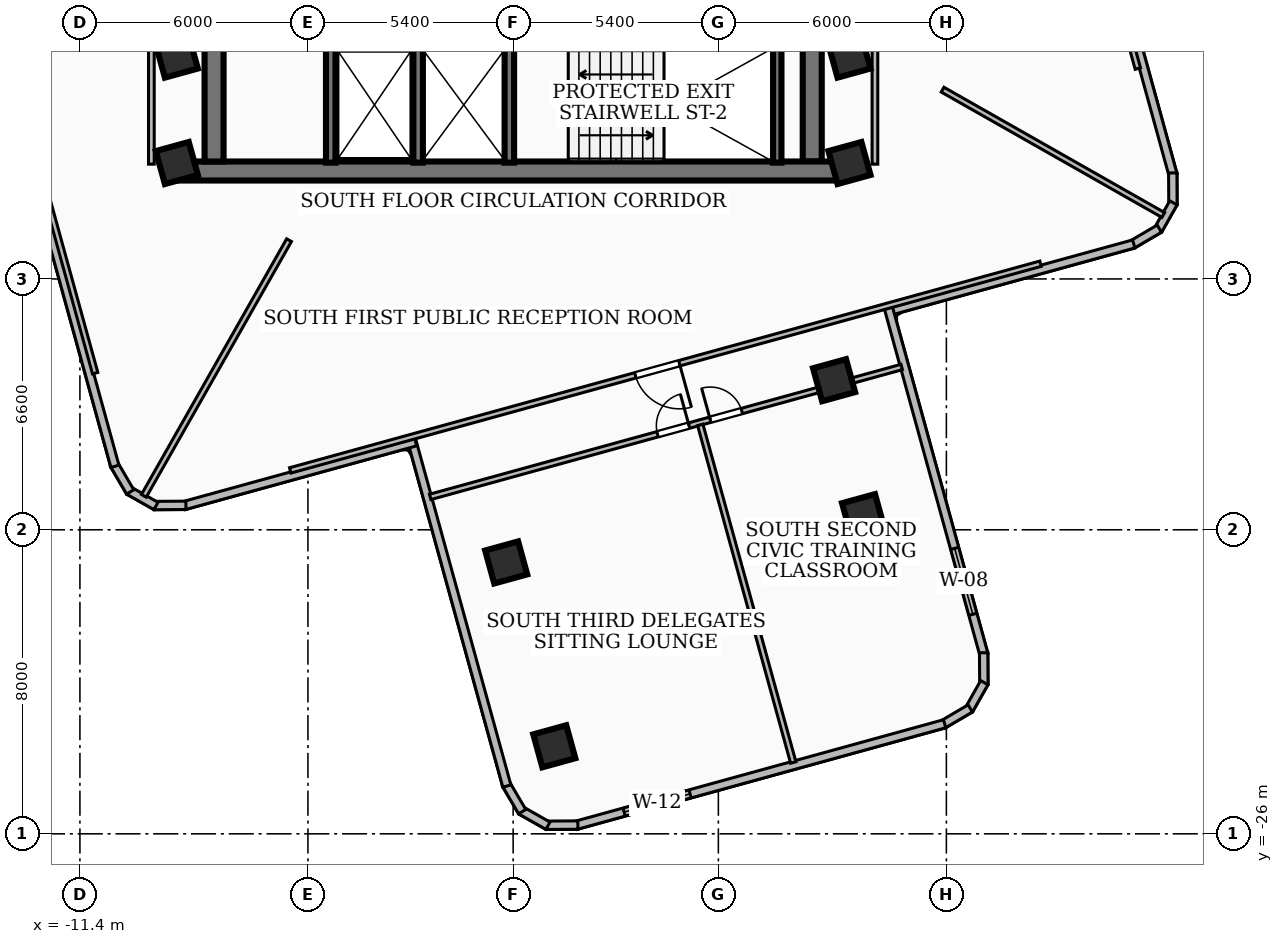
"""IFC4 building model, lengths in metres.
Left out: names, types, materials, properties, quantities, classifications, styles, units other than length and angle.
Written with IfcOpenShell. Run it as: python <this file> out.ifc"""

import sys

from ifc_helpers import new_model, si_unit, direction, frame, frame_2d, origin, origin_2d, place, context, subcontext, project, spatial, rectangle, extrude, element, fill, save


model = new_model("IFC4")
c1 = context("Model", 3, precision=1e-05, world=origin(), true_north=direction((0.0, 1.0)))
c2 = subcontext(c1, "Body", "Model", "MODEL_VIEW")
j1 = project(units=[si_unit("LENGTHUNIT", "METRE"), si_unit("PLANEANGLEUNIT", "RADIAN")], contexts=[c1])
p1 = place(None, origin())
s1 = spatial("IfcSite", under=j1, at=p1, CompositionType="ELEMENT")
p2 = place(p1, origin())
s2 = spatial("IfcBuilding", under=s1, at=p2, CompositionType="ELEMENT")
p3 = place(p2, frame((0.0, 0.0, 137.88)))
s3 = spatial("IfcBuildingStorey", under=s2, at=p3, CompositionType="ELEMENT", Elevation=137.88)
p4 = place(p3, frame((8.78, -8.56, 0.0), z_axis=(0.0, 0.0, 1.0), x_axis=(-1.0, 0.0, 0.0)))
e1 = element("IfcWall", 1, at=p4, inside=s3, PredefinedType="SHEAR", context=c2, shape_type="SweptSolid", body=[
    extrude(rectangle(XDim=17.56, YDim=0.5, at=frame_2d((8.78, 0.0))), origin(), (0.0, 0.0, 1.0), 3.32),
])
for number, where, z_axis, x_axis in (
    (2, (-7.87, -8.31, 0.0), (0.0, 0.0, 1.0), (0.0, 1.0, 0.0)),
    (3, (7.87, -2.0, 0.0), (0.0, 0.0, 1.0), (0.0, -1.0, 0.0)),
):
    element("IfcWall", number, at=place(p3, frame(where, z_axis=z_axis, x_axis=x_axis)), inside=s3, PredefinedType="SHEAR", context=c2, shape_type="SweptSolid", body=[
        extrude(rectangle(XDim=6.31, YDim=0.5, at=frame_2d((3.155, 0.0))), origin(), (0.0, 0.0, 1.0), 3.32),
    ])
p5 = place(p3, frame((6.95, -8.34, 0.0), z_axis=(0.0, 0.0, 1.0), x_axis=(0.0, 1.0, 0.0)))
e4 = element("IfcWall", 4, at=p5, inside=s3, PredefinedType="SOLIDWALL", context=c2, shape_type="SweptSolid", body=[
    extrude(rectangle(XDim=3.06, YDim=0.22, at=frame_2d((1.53, 0.0))), origin(), (0.0, 0.0, 1.0), 3.32),
])
for number, where, z_axis, x_axis in (
    (5, (-0.1, -8.34, 0.0), (0.0, 0.0, 1.0), (0.0, 1.0, 0.0)),
    (6, (-2.5, -8.34, 0.0), (0.0, 0.0, 1.0), (0.0, 1.0, 0.0)),
    (7, (-4.8, -8.34, 0.0), (0.0, 0.0, 1.0), (0.0, 1.0, 0.0)),
):
    element("IfcWall", number, at=place(p3, frame(where, z_axis=z_axis, x_axis=x_axis)), inside=s3, PredefinedType="SOLIDWALL", context=c2, shape_type="SweptSolid", body=[
        extrude(rectangle(XDim=3.04, YDim=0.25, at=frame_2d((1.52, 0.0))), origin(), (0.0, 0.0, 1.0), 3.32),
    ])
for number, where, z_axis, x_axis in (
    (8, (-8.85, -5.55, 0.0), (0.0, 0.0, 1.0), (0.964, 0.266, 0.0)),
    (9, (8.85, -5.55, 0.0), (0.0, 0.0, 1.0), (0.964, 0.266, 0.0)),
    (10, (8.85, -8.35, 0.0), (0.0, 0.0, 1.0), (0.964, 0.266, 0.0)),
    (11, (-8.85, -8.35, 0.0), (0.0, 0.0, 1.0), (0.964, 0.266, 0.0)),
    (12, (-0.183, -18.86, 0.0), (0.0, 0.0, 1.0), (0.964, 0.266, 0.0)),
    (13, (8.445, -14.064, 0.0), (0.0, 0.0, 1.0), (0.964, 0.266, 0.0)),
    (14, (1.083, -23.697, 0.0), (0.0, 0.0, 1.0), (0.964, 0.266, 0.0)),
    (15, (9.208, -17.615, 0.0), (0.0, 0.0, 1.0), (0.964, 0.266, 0.0)),
):
    element("IfcColumn", number, at=place(p3, frame(where, z_axis=z_axis, x_axis=x_axis)), inside=s3, PredefinedType="COLUMN", context=c2, shape_type="SweptSolid", body=[
        extrude(rectangle(XDim=0.9, YDim=0.9, at=origin_2d()), origin(), (0.0, 0.0, 1.0), 3.6),
    ])
p6 = place(p3, frame((-12.166, -9.876, 0.0), z_axis=(0.0, 0.0, 1.0), x_axis=(-0.964099811745, -0.2655401156, 0.0)))
e16 = element("IfcWall", 16, at=p6, inside=s3, PredefinedType="SOLIDWALL", context=c2, shape_type="SweptSolid", body=[
    extrude(rectangle(XDim=13.459, YDim=0.22, at=frame_2d((6.729, 0.0))), origin(), (0.0, 0.0, 1.0), 2.624),
])
p7 = place(p3, frame((15.686, -2.568, 0.0), z_axis=(0.0, 0.0, 1.0), x_axis=(0.265558779784, -0.964094670911, 0.0)))
e17 = element("IfcWall", 17, at=p7, inside=s3, PredefinedType="SOLIDWALL", context=c2, shape_type="SweptSolid", body=[
    extrude(rectangle(XDim=6.319, YDim=0.22, at=frame_2d((3.159, 0.0))), origin(), (0.0, 0.0, 1.0), 3.32),
])
p8 = place(p3, frame((17.357, -8.611, 0.0), z_axis=(0.0, 0.0, 1.0), x_axis=(0.006140235123, -0.999981148579, 0.0)))
e18 = element("IfcWall", 18, at=p8, inside=s3, PredefinedType="SOLIDWALL", context=c2, shape_type="SweptSolid", body=[
    extrude(rectangle(XDim=0.835, YDim=0.22, at=frame_2d((0.417, 0.0))), origin(), (0.0, 0.0, 1.0), 3.32),
])
p9 = place(p3, frame((17.374, -9.399, 0.0), z_axis=(0.0, 0.0, 1.0), x_axis=(-0.492959963164, -0.87005199541, 0.0)))
e19 = element("IfcWall", 19, at=p9, inside=s3, PredefinedType="SOLIDWALL", context=c2, shape_type="SweptSolid", body=[
    extrude(rectangle(XDim=0.82, YDim=0.22, at=frame_2d((0.41, 0.0))), origin(), (0.0, 0.0, 1.0), 3.32),
])
p10 = place(p3, frame((17.004, -10.077, 0.0), z_axis=(0.0, 0.0, 1.0), x_axis=(-0.862662761192, -0.505779557172, 0.0)))
e20 = element("IfcWall", 20, at=p10, inside=s3, PredefinedType="SOLIDWALL", context=c2, shape_type="SweptSolid", body=[
    extrude(rectangle(XDim=0.834, YDim=0.22, at=frame_2d((0.417, 0.0))), origin(), (0.0, 0.0, 1.0), 3.32),
])
p11 = place(p3, frame((16.33, -10.479, 0.0), z_axis=(0.0, 0.0, 1.0), x_axis=(-0.964092175021, -0.265567840793, 0.0)))
e21 = element("IfcWall", 21, at=p11, inside=s3, PredefinedType="SOLIDWALL", context=c2, shape_type="SweptSolid", body=[
    extrude(rectangle(XDim=6.759, YDim=0.22, at=frame_2d((3.379, 0.0))), origin(), (0.0, 0.0, 1.0), 3.32),
])
p12 = place(p3, frame((9.876, -12.166, 0.0), z_axis=(0.0, 0.0, 1.0), x_axis=(0.265575803102, -0.964089981696, 0.0)))
e22 = element("IfcWall", 22, at=p12, inside=s3, PredefinedType="SOLIDWALL", context=c2, shape_type="SweptSolid", body=[
    extrude(rectangle(XDim=9.458, YDim=0.22, at=frame_2d((4.729, 0.0))), origin(), (0.0, 0.0, 1.0), 3.32),
])
p13 = place(p12, frame((6.559, 0.0, 0.85)))
e23 = element("IfcOpeningElement", 23, at=p13, cuts=e22, PredefinedType="OPENING", context=c2, shape_type="SweptSolid", body=[
    extrude(rectangle(XDim=1.8, YDim=1.8, at=frame_2d((0.9, 0.9))), frame((0.0, 0.12, 0.0), z_axis=(0.0, -1.0, 0.0), x_axis=(1.0, 0.0, 0.0)), (0.0, 0.0, 1.0), 0.24),
])
p14 = place(p3, frame((12.381, -21.236, 0.0), z_axis=(0.0, 0.0, 1.0), x_axis=(0.005854700592, -0.999982861094, 0.0)))
e24 = element("IfcWall", 24, at=p14, inside=s3, PredefinedType="SOLIDWALL", context=c2, shape_type="SweptSolid", body=[
    extrude(rectangle(XDim=0.834, YDim=0.22, at=frame_2d((0.417, 0.0))), origin(), (0.0, 0.0, 1.0), 3.32),
])
p15 = place(p3, frame((12.398, -22.023, 0.0), z_axis=(0.0, 0.0, 1.0), x_axis=(-0.492959963164, -0.87005199541, 0.0)))
e25 = element("IfcWall", 25, at=p15, inside=s3, PredefinedType="SOLIDWALL", context=c2, shape_type="SweptSolid", body=[
    extrude(rectangle(XDim=0.82, YDim=0.22, at=frame_2d((0.41, 0.0))), origin(), (0.0, 0.0, 1.0), 3.32),
])
p16 = place(p3, frame((12.028, -22.701, 0.0), z_axis=(0.0, 0.0, 1.0), x_axis=(-0.86215208584, -0.506649564178, 0.0)))
e26 = element("IfcWall", 26, at=p16, inside=s3, PredefinedType="SOLIDWALL", context=c2, shape_type="SweptSolid", body=[
    extrude(rectangle(XDim=0.835, YDim=0.22, at=frame_2d((0.417, 0.0))), origin(), (0.0, 0.0, 1.0), 3.32),
])
p17 = place(p3, frame((11.354, -23.104, 0.0), z_axis=(0.0, 0.0, 1.0), x_axis=(-0.964062724545, -0.265674731848, 0.0)))
e27 = element("IfcWall", 27, at=p17, inside=s3, PredefinedType="SOLIDWALL", context=c2, shape_type="SweptSolid", body=[
    extrude(rectangle(XDim=10.062, YDim=0.22, at=frame_2d((5.031, 0.0))), origin(), (0.0, 0.0, 1.0), 3.32),
])
p18 = place(p17, frame((6.948, 0.0, 0.85)))
e28 = element("IfcOpeningElement", 28, at=p18, cuts=e27, PredefinedType="OPENING", context=c2, shape_type="SweptSolid", body=[
    extrude(rectangle(XDim=1.8, YDim=1.6, at=frame_2d((0.9, 0.8))), frame((0.0, 0.12, 0.0), z_axis=(0.0, -1.0, 0.0), x_axis=(1.0, 0.0, 0.0)), (0.0, 0.0, 1.0), 0.24),
])
p19 = place(p3, frame((1.703, -25.77, 0.0), z_axis=(0.0, 0.0, 1.0), x_axis=(-0.999982861094, -0.005854700592, 0.0)))
e29 = element("IfcWall", 29, at=p19, inside=s3, PredefinedType="SOLIDWALL", context=c2, shape_type="SweptSolid", body=[
    extrude(rectangle(XDim=0.834, YDim=0.22, at=frame_2d((0.417, 0.0))), origin(), (0.0, 0.0, 1.0), 3.32),
])
p20 = place(p3, frame((0.916, -25.787, 0.0), z_axis=(0.0, 0.0, 1.0), x_axis=(-0.87005199541, 0.492959963164, 0.0)))
e30 = element("IfcWall", 30, at=p20, inside=s3, PredefinedType="SOLIDWALL", context=c2, shape_type="SweptSolid", body=[
    extrude(rectangle(XDim=0.82, YDim=0.22, at=frame_2d((0.41, 0.0))), origin(), (0.0, 0.0, 1.0), 3.32),
])
p21 = place(p3, frame((0.238, -25.417, 0.0), z_axis=(0.0, 0.0, 1.0), x_axis=(-0.506649564178, 0.86215208584, 0.0)))
e31 = element("IfcWall", 31, at=p21, inside=s3, PredefinedType="SOLIDWALL", context=c2, shape_type="SweptSolid", body=[
    extrude(rectangle(XDim=0.835, YDim=0.22, at=frame_2d((0.417, 0.0))), origin(), (0.0, 0.0, 1.0), 3.32),
])
p22 = place(p3, frame((-0.165, -24.743, 0.0), z_axis=(0.0, 0.0, 1.0), x_axis=(-0.265479834686, 0.964116412771, 0.0)))
e32 = element("IfcWall", 32, at=p22, inside=s3, PredefinedType="SOLIDWALL", context=c2, shape_type="SweptSolid", body=[
    extrude(rectangle(XDim=9.458, YDim=0.22, at=frame_2d((4.729, 0.0))), origin(), (0.0, 0.0, 1.0), 2.55),
])
p23 = place(p3, frame((-2.568, -15.686, 0.0), z_axis=(0.0, 0.0, 1.0), x_axis=(-0.964094670911, -0.265558779784, 0.0)))
e33 = element("IfcWall", 33, at=p23, inside=s3, PredefinedType="SOLIDWALL", context=c2, shape_type="SweptSolid", body=[
    extrude(rectangle(XDim=6.319, YDim=0.22, at=frame_2d((3.159, 0.0))), origin(), (0.0, 0.0, 1.0), 2.55),
])
p24 = place(p3, frame((-8.611, -17.357, 0.0), z_axis=(0.0, 0.0, 1.0), x_axis=(-0.999981148579, -0.006140235123, 0.0)))
e34 = element("IfcWall", 34, at=p24, inside=s3, PredefinedType="SOLIDWALL", context=c2, shape_type="SweptSolid", body=[
    extrude(rectangle(XDim=0.835, YDim=0.22, at=frame_2d((0.417, 0.0))), origin(), (0.0, 0.0, 1.0), 3.32),
])
p25 = place(p3, frame((-9.399, -17.374, 0.0), z_axis=(0.0, 0.0, 1.0), x_axis=(-0.87005199541, 0.492959963164, 0.0)))
e35 = element("IfcWall", 35, at=p25, inside=s3, PredefinedType="SOLIDWALL", context=c2, shape_type="SweptSolid", body=[
    extrude(rectangle(XDim=0.82, YDim=0.22, at=frame_2d((0.41, 0.0))), origin(), (0.0, 0.0, 1.0), 3.32),
])
p26 = place(p3, frame((-10.077, -17.004, 0.0), z_axis=(0.0, 0.0, 1.0), x_axis=(-0.505779557172, 0.862662761192, 0.0)))
e36 = element("IfcWall", 36, at=p26, inside=s3, PredefinedType="SOLIDWALL", context=c2, shape_type="SweptSolid", body=[
    extrude(rectangle(XDim=0.834, YDim=0.22, at=frame_2d((0.417, 0.0))), origin(), (0.0, 0.0, 1.0), 3.32),
])
p27 = place(p3, frame((-10.479, -16.33, 0.0), z_axis=(0.0, 0.0, 1.0), x_axis=(-0.265567840793, 0.964092175021, 0.0)))
e37 = element("IfcWall", 37, at=p27, inside=s3, PredefinedType="SOLIDWALL", context=c2, shape_type="SweptSolid", body=[
    extrude(rectangle(XDim=6.759, YDim=0.22, at=frame_2d((3.379, 0.0))), origin(), (0.0, 0.0, 1.0), 2.624),
])
for number, where, z_axis, x_axis in (
    (38, (-9.52, -8.38, 0.0), (0.0, 0.0, 1.0), (0.0, 1.0, 0.0)),
    (39, (9.52, -8.38, 0.0), (0.0, 0.0, 1.0), (0.0, 1.0, 0.0)),
):
    element("IfcWall", number, at=place(p3, frame(where, z_axis=z_axis, x_axis=x_axis)), inside=s3, PredefinedType="PARTITIONING", context=c2, shape_type="SweptSolid", body=[
        extrude(rectangle(XDim=6.63, YDim=0.15, at=frame_2d((3.315, 0.0))), origin(), (0.0, 0.0, 1.0), 2.55),
    ])
p28 = place(p3, frame((-5.897, -10.38, 0.0), z_axis=(0.0, 0.0, 1.0), x_axis=(-0.49389771586, -0.869520009125, 0.0)))
e40 = element("IfcWall", 40, at=p28, inside=s3, PredefinedType="PARTITIONING", context=c2, shape_type="SweptSolid", body=[
    extrude(rectangle(XDim=7.737, YDim=0.145, at=frame_2d((3.868, 0.0))), origin(), (0.0, 0.0, 1.0), 2.55),
])
p29 = place(p3, frame((11.3, -6.419, 0.0), z_axis=(0.0, 0.0, 1.0), x_axis=(0.869475469758, -0.493976120363, 0.0)))
e41 = element("IfcWall", 41, at=p29, inside=s3, PredefinedType="PARTITIONING", context=c2, shape_type="SweptSolid", body=[
    extrude(rectangle(XDim=6.679, YDim=0.145, at=frame_2d((3.339, 0.0))), origin(), (0.0, 0.0, 1.0), 3.32),
])
p30 = place(p3, frame((10.999, 13.879, 0.0), z_axis=(0.0, 0.0, 1.0), x_axis=(0.26558288107, -0.964088031915, 0.0)))
e42 = element("IfcWall", 42, at=p30, inside=s3, PredefinedType="PARTITIONING", context=c2, shape_type="SweptSolid", body=[
    extrude(rectangle(XDim=20.479, YDim=0.145, at=frame_2d((10.24, 0.0))), origin(), (0.0, 0.0, 1.0), 2.55),
])
p31 = place(p30, frame((9.86, 0.0, 0.0)))
e43 = element("IfcOpeningElement", 43, at=p31, cuts=e42, PredefinedType="OPENING", context=c2, shape_type="SweptSolid", body=[
    extrude(rectangle(XDim=1.2, YDim=2.1, at=frame_2d((0.6, 1.05))), frame((0.0, 0.083, 0.0), z_axis=(0.0, -1.0, 0.0), x_axis=(1.0, 0.0, 0.0)), (0.0, 0.0, 1.0), 0.165),
])
p32 = place(p3, frame((-10.999, -13.879, 0.0), z_axis=(0.0, 0.0, 1.0), x_axis=(-0.26558288107, 0.964088031915, 0.0)))
e44 = element("IfcWall", 44, at=p32, inside=s3, PredefinedType="PARTITIONING", context=c2, shape_type="SweptSolid", body=[
    extrude(rectangle(XDim=20.479, YDim=0.145, at=frame_2d((10.24, 0.0))), origin(), (0.0, 0.0, 1.0), 2.55),
])
p33 = place(p32, frame((9.86, 0.0, 0.0)))
e45 = element("IfcOpeningElement", 45, at=p33, cuts=e44, PredefinedType="OPENING", context=c2, shape_type="SweptSolid", body=[
    extrude(rectangle(XDim=1.2, YDim=2.1, at=frame_2d((0.6, 1.05))), frame((0.0, 0.083, 0.0), z_axis=(0.0, -1.0, 0.0), x_axis=(1.0, 0.0, 0.0)), (0.0, 0.0, 1.0), 0.165),
])
p34 = place(p3, frame((13.879, -10.999, 0.0), z_axis=(0.0, 0.0, 1.0), x_axis=(-0.964088031915, -0.26558288107, 0.0)))
e46 = element("IfcWall", 46, at=p34, inside=s3, PredefinedType="PARTITIONING", context=c2, shape_type="SweptSolid", body=[
    extrude(rectangle(XDim=20.479, YDim=0.145, at=frame_2d((10.24, 0.0))), origin(), (0.0, 0.0, 1.0), 2.55),
])
p35 = place(p34, frame((9.86, 0.0, 0.0)))
e47 = element("IfcOpeningElement", 47, at=p35, cuts=e46, PredefinedType="OPENING", context=c2, shape_type="SweptSolid", body=[
    extrude(rectangle(XDim=1.2, YDim=2.1, at=frame_2d((0.6, 1.05))), frame((0.0, 0.083, 0.0), z_axis=(0.0, -1.0, 0.0), x_axis=(1.0, 0.0, 0.0)), (0.0, 0.0, 1.0), 0.165),
])
p36 = place(p3, frame((4.924, -15.24, 0.0), z_axis=(0.0, 0.0, 1.0), x_axis=(0.26555117946, -0.96409676438, 0.0)))
e48 = element("IfcWall", 48, at=p36, inside=s3, PredefinedType="PARTITIONING", context=c2, shape_type="SweptSolid", body=[
    extrude(rectangle(XDim=9.215, YDim=0.145, at=frame_2d((4.607, 0.0))), origin(), (0.0, 0.0, 1.0), 2.812),
])
p37 = place(p3, frame((-2.183, -17.135, 0.0), z_axis=(0.0, 0.0, 1.0), x_axis=(0.964091819819, 0.265569130282, 0.0)))
e49 = element("IfcWall", 49, at=p37, inside=s3, PredefinedType="PARTITIONING", context=c2, shape_type="SweptSolid", body=[
    extrude(rectangle(XDim=12.87, YDim=0.145, at=frame_2d((6.435, 0.0))), origin(), (0.0, 0.0, 1.0), 2.55),
])
p38 = place(p37, frame((6.205, 0.0, 0.0)))
e50 = element("IfcOpeningElement", 50, at=p38, cuts=e49, PredefinedType="OPENING", context=c2, shape_type="SweptSolid", body=[
    extrude(rectangle(XDim=0.86, YDim=2.04, at=frame_2d((0.43, 1.02))), frame((0.0, 0.083, 0.0), z_axis=(0.0, -1.0, 0.0), x_axis=(1.0, 0.0, 0.0)), (0.0, 0.0, 1.0), 0.165),
])
p39 = place(p37, frame((7.645, 0.0, 0.0)))
e51 = element("IfcOpeningElement", 51, at=p39, cuts=e49, PredefinedType="OPENING", context=c2, shape_type="SweptSolid", body=[
    extrude(rectangle(XDim=0.86, YDim=2.04, at=frame_2d((0.43, 1.02))), frame((0.0, 0.083, 0.0), z_axis=(0.0, -1.0, 0.0), x_axis=(1.0, 0.0, 0.0)), (0.0, 0.0, 1.0), 0.165),
])
p40 = place(p13, origin())
e52 = element("IfcWindow", 52, at=p40, inside=s3, PartitioningType="SINGLE_PANEL", PredefinedType="WINDOW", context=c2, shape_type="SweptSolid", body=[
    extrude(rectangle(XDim=1.8, YDim=1.8, at=frame_2d((0.9, 0.9))), frame((0.0, 0.03, 0.0), z_axis=(0.0, -1.0, 0.0), x_axis=(1.0, 0.0, 0.0)), (0.0, 0.0, 1.0), 0.06),
])
fill(e23, e52)
p41 = place(p18, origin())
e53 = element("IfcWindow", 53, at=p41, inside=s3, PartitioningType="SINGLE_PANEL", PredefinedType="WINDOW", context=c2, shape_type="SweptSolid", body=[
    extrude(rectangle(XDim=1.8, YDim=1.6, at=frame_2d((0.9, 0.8))), frame((0.0, 0.03, 0.0), z_axis=(0.0, -1.0, 0.0), x_axis=(1.0, 0.0, 0.0)), (0.0, 0.0, 1.0), 0.06),
])
fill(e28, e53)
p42 = place(p35, origin())
e54 = element("IfcDoor", 54, at=p42, inside=s3, OperationType="SINGLE_SWING_LEFT", PredefinedType="DOOR", context=c2, shape_type="SweptSolid", body=[
    extrude(rectangle(XDim=1.2, YDim=2.1, at=frame_2d((0.6, 1.05))), frame((0.0, 0.025, 0.0), z_axis=(0.0, -1.0, 0.0), x_axis=(1.0, 0.0, 0.0)), (0.0, 0.0, 1.0), 0.05),
])
fill(e47, e54)
p43 = place(p38, origin())
e55 = element("IfcDoor", 55, at=p43, inside=s3, OperationType="SINGLE_SWING_RIGHT", PredefinedType="DOOR", context=c2, shape_type="SweptSolid", body=[
    extrude(rectangle(XDim=0.86, YDim=2.04, at=frame_2d((0.43, 1.02))), frame((0.0, 0.025, 0.0), z_axis=(0.0, -1.0, 0.0), x_axis=(1.0, 0.0, 0.0)), (0.0, 0.0, 1.0), 0.05),
])
fill(e50, e55)
p44 = place(p39, origin())
e56 = element("IfcDoor", 56, at=p44, inside=s3, OperationType="SINGLE_SWING_LEFT", PredefinedType="DOOR", context=c2, shape_type="SweptSolid", body=[
    extrude(rectangle(XDim=0.86, YDim=2.04, at=frame_2d((0.43, 1.02))), frame((0.0, 0.025, 0.0), z_axis=(0.0, -1.0, 0.0), x_axis=(1.0, 0.0, 0.0)), (0.0, 0.0, 1.0), 0.05),
])
fill(e51, e56)
save(model, sys.argv[1])
